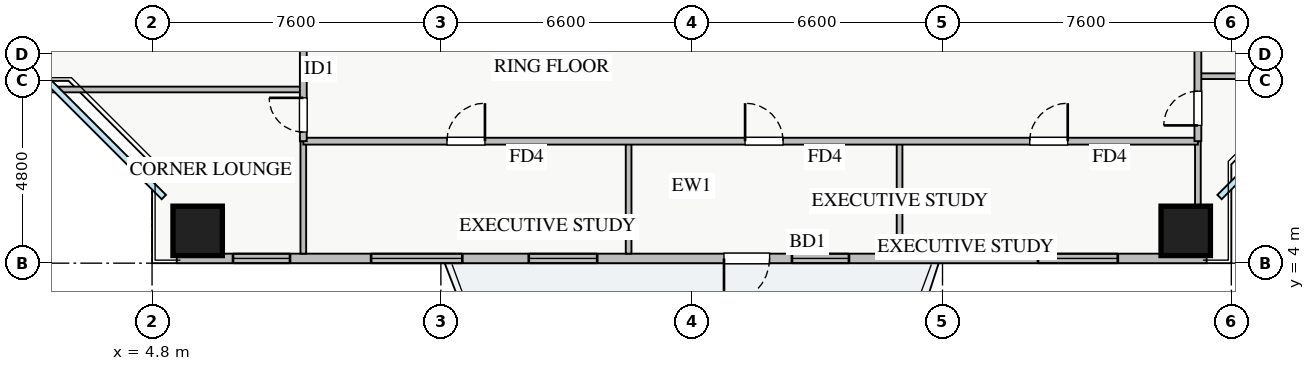
"""IFC4 building model, lengths in metres.
Left out: names, types, materials, properties, quantities, classifications, styles, units other than length and angle.
Written with IfcOpenShell. Run it as: python <this file> out.ifc"""

import sys

from ifc_helpers import new_model, si_unit, direction, frame, frame_2d, origin, origin_2d, place, context, subcontext, project, spatial, rectangle, extrude, source, transform, mapped, element, fill, save


model = new_model("IFC4")
c1 = context("Model", 3, precision=1e-05, world=origin(), true_north=direction((0.0, 1.0)))
c2 = subcontext(c1, "Body", "Model", "MODEL_VIEW")
j1 = project(units=[si_unit("LENGTHUNIT", "METRE"), si_unit("PLANEANGLEUNIT", "RADIAN")], contexts=[c1])
p1 = place(None, origin())
s1 = spatial("IfcSite", under=j1, at=p1, CompositionType="ELEMENT")
p2 = place(p1, origin())
s2 = spatial("IfcBuilding", under=s1, at=p2, CompositionType="ELEMENT")
p3 = place(p2, frame((0.0, 0.0, 29.5)))
s3 = spatial("IfcBuildingStorey", under=s2, at=p3, CompositionType="ELEMENT", Elevation=29.5)
m1 = source(origin(), c2, "Body", "SweptSolid", [
    extrude(rectangle(XDim=1.3, YDim=1.3, at=origin_2d()), origin(), (0.0, 0.0, 1.0), 3.25),
])
for number, where, z_axis, x_axis in (
    (1, (6.0, 4.85, 0.0), (0.0, 0.0, 1.0), (1.0, 0.0, 0.0)),
    (2, (32.0, 4.85, 0.0), (0.0, 0.0, 1.0), (1.0, 0.0, 0.0)),
):
    element("IfcColumn", number, at=place(p3, frame(where, z_axis=z_axis, x_axis=x_axis)), inside=s3, PredefinedType="COLUMN", context=c2, shape_type="MappedRepresentation", body=[
        mapped(m1, transform((0.0, 0.0, 0.0), x_axis=(1.0, 0.0, 0.0), y_axis=(0.0, 1.0, 0.0), z_axis=(0.0, 0.0, 1.0), scale=1.0)),
    ])
p4 = place(p3, frame((5.45, 4.125, 0.0), z_axis=(0.0, 0.0, 1.0), x_axis=(1.0, 0.0, 0.0)))
e3 = element("IfcWall", 3, at=p4, inside=s3, PredefinedType="STANDARD", context=c2, shape_type="SweptSolid", body=[
    extrude(rectangle(XDim=27.1, YDim=0.25, at=frame_2d((13.55, 0.0))), origin(), (0.0, 0.0, 1.0), 2.61),
])
p5 = place(p4, frame((14.4, 0.0, 0.0)))
e4 = element("IfcOpeningElement", 4, at=p5, cuts=e3, PredefinedType="OPENING", context=c2, shape_type="SweptSolid", body=[
    extrude(rectangle(XDim=1.2, YDim=2.1, at=frame_2d((0.6, 1.05))), frame((0.0, 0.135, 0.0), z_axis=(0.0, -1.0, 0.0), x_axis=(1.0, 0.0, 0.0)), (0.0, 0.0, 1.0), 0.27),
])
p6 = place(p4, frame((1.48, 0.0, 0.9)))
e5 = element("IfcOpeningElement", 5, at=p6, cuts=e3, PredefinedType="OPENING", context=c2, shape_type="SweptSolid", body=[
    extrude(rectangle(XDim=1.5, YDim=1.5, at=frame_2d((0.75, 0.75))), frame((0.0, 0.135, 0.0), z_axis=(0.0, -1.0, 0.0), x_axis=(1.0, 0.0, 0.0)), (0.0, 0.0, 1.0), 0.27),
])
p7 = place(p4, frame((9.263, 0.0, 0.9)))
e6 = element("IfcOpeningElement", 6, at=p7, cuts=e3, PredefinedType="OPENING", context=c2, shape_type="SweptSolid", body=[
    extrude(rectangle(XDim=1.8, YDim=1.45, at=frame_2d((0.9, 0.725))), frame((0.0, 0.135, 0.0), z_axis=(0.0, -1.0, 0.0), x_axis=(1.0, 0.0, 0.0)), (0.0, 0.0, 1.0), 0.27),
])
p8 = place(p4, frame((16.188, 0.0, 0.9)))
e7 = element("IfcOpeningElement", 7, at=p8, cuts=e3, PredefinedType="OPENING", context=c2, shape_type="SweptSolid", body=[
    extrude(rectangle(XDim=1.5, YDim=1.45, at=frame_2d((0.75, 0.725))), frame((0.0, 0.135, 0.0), z_axis=(0.0, -1.0, 0.0), x_axis=(1.0, 0.0, 0.0)), (0.0, 0.0, 1.0), 0.27),
])
p9 = place(p4, frame((22.663, 0.0, 0.9)))
e8 = element("IfcOpeningElement", 8, at=p9, cuts=e3, PredefinedType="OPENING", context=c2, shape_type="SweptSolid", body=[
    extrude(rectangle(XDim=2.1, YDim=1.48, at=frame_2d((1.05, 0.74))), frame((0.0, 0.135, 0.0), z_axis=(0.0, -1.0, 0.0), x_axis=(1.0, 0.0, 0.0)), (0.0, 0.0, 1.0), 0.27),
])
p10 = place(p4, frame((5.114, 0.0, 0.9)))
e9 = element("IfcOpeningElement", 9, at=p10, cuts=e3, PredefinedType="OPENING", context=c2, shape_type="SweptSolid", body=[
    extrude(rectangle(XDim=2.4, YDim=1.5, at=frame_2d((1.2, 0.75))), frame((0.0, 0.135, 0.0), z_axis=(0.0, -1.0, 0.0), x_axis=(1.0, 0.0, 0.0)), (0.0, 0.0, 1.0), 0.27),
])
for number, where, z_axis, x_axis in (
    (10, (17.34, 4.25, 0.0), (0.0, 0.0, 1.0), (0.0, 1.0, 0.0)),
    (11, (24.47, 4.25, 0.0), (0.0, 0.0, 1.0), (0.0, 1.0, 0.0)),
    (12, (8.78, 4.25, 0.0), (0.0, 0.0, 1.0), (0.0, 1.0, 0.0)),
    (13, (32.32, 4.25, 0.0), (0.0, 0.0, 1.0), (0.0, 1.0, 0.0)),
):
    element("IfcWall", number, at=place(p3, frame(where, z_axis=z_axis, x_axis=x_axis)), inside=s3, PredefinedType="PARTITIONING", context=c2, shape_type="SweptSolid", body=[
        extrude(rectangle(XDim=2.96, YDim=0.15, at=frame_2d((1.48, 0.0))), origin(), (0.0, 0.0, 1.0), 3.07),
    ])
p11 = place(p3, frame((8.78, 7.21, 0.0), z_axis=(0.0, 0.0, 1.0), x_axis=(1.0, 0.0, 0.0)))
e14 = element("IfcWall", 14, at=p11, inside=s3, PredefinedType="PARTITIONING", context=c2, shape_type="SweptSolid", body=[
    extrude(rectangle(XDim=23.54, YDim=0.18, at=frame_2d((11.77, 0.0))), origin(), (0.0, 0.0, 1.0), 3.07),
])
p12 = place(p11, frame((3.78, 0.0, 0.0)))
e15 = element("IfcOpeningElement", 15, at=p12, cuts=e14, PredefinedType="OPENING", context=c2, shape_type="SweptSolid", body=[
    extrude(rectangle(XDim=1.0, YDim=2.05, at=frame_2d((0.5, 1.025))), frame((0.0, 0.1, 0.0), z_axis=(0.0, -1.0, 0.0), x_axis=(1.0, 0.0, 0.0)), (0.0, 0.0, 1.0), 0.2),
])
p13 = place(p11, frame((11.625, 0.0, 0.0)))
e16 = element("IfcOpeningElement", 16, at=p13, cuts=e14, PredefinedType="OPENING", context=c2, shape_type="SweptSolid", body=[
    extrude(rectangle(XDim=1.0, YDim=2.05, at=frame_2d((0.5, 1.025))), frame((0.0, 0.1, 0.0), z_axis=(0.0, -1.0, 0.0), x_axis=(1.0, 0.0, 0.0)), (0.0, 0.0, 1.0), 0.2),
])
p14 = place(p11, frame((19.115, 0.0, 0.0)))
e17 = element("IfcOpeningElement", 17, at=p14, cuts=e14, PredefinedType="OPENING", context=c2, shape_type="SweptSolid", body=[
    extrude(rectangle(XDim=1.0, YDim=2.05, at=frame_2d((0.5, 1.025))), frame((0.0, 0.1, 0.0), z_axis=(0.0, -1.0, 0.0), x_axis=(1.0, 0.0, 0.0)), (0.0, 0.0, 1.0), 0.2),
])
p15 = place(p3, frame((0.25, 8.57, 0.0), z_axis=(0.0, 0.0, 1.0), x_axis=(1.0, 0.0, 0.0)))
e18 = element("IfcWall", 18, at=p15, inside=s3, PredefinedType="PARTITIONING", context=c2, shape_type="SweptSolid", body=[
    extrude(rectangle(XDim=8.53, YDim=0.15, at=frame_2d((4.265, 0.0))), origin(), (0.0, 0.0, 1.0), 3.07),
])
p16 = place(p3, frame((8.78, 7.21, 0.0), z_axis=(0.0, 0.0, 1.0), x_axis=(0.0, 1.0, 0.0)))
e19 = element("IfcWall", 19, at=p16, inside=s3, PredefinedType="PARTITIONING", context=c2, shape_type="SweptSolid", body=[
    extrude(rectangle(XDim=31.23, YDim=0.18, at=frame_2d((15.615, 0.0))), origin(), (0.0, 0.0, 1.0), 3.07),
])
p17 = place(p16, frame((30.09, 0.0, 0.0)))
e20 = element("IfcOpeningElement", 20, at=p17, cuts=e19, PredefinedType="OPENING", context=c2, shape_type="SweptSolid", body=[
    extrude(rectangle(XDim=0.9, YDim=2.05, at=frame_2d((0.45, 1.025))), frame((0.0, 0.1, 0.0), z_axis=(0.0, -1.0, 0.0), x_axis=(1.0, 0.0, 0.0)), (0.0, 0.0, 1.0), 0.2),
])
p18 = place(p16, frame((0.24, 0.0, 0.0)))
e21 = element("IfcOpeningElement", 21, at=p18, cuts=e19, PredefinedType="OPENING", context=c2, shape_type="SweptSolid", body=[
    extrude(rectangle(XDim=0.9, YDim=2.05, at=frame_2d((0.45, 1.025))), frame((0.0, 0.1, 0.0), z_axis=(0.0, -1.0, 0.0), x_axis=(1.0, 0.0, 0.0)), (0.0, 0.0, 1.0), 0.2),
])
p19 = place(p16, frame((3.975, 0.0, 0.0)))
e22 = element("IfcOpeningElement", 22, at=p19, cuts=e19, PredefinedType="OPENING", context=c2, shape_type="SweptSolid", body=[
    extrude(rectangle(XDim=1.0, YDim=2.05, at=frame_2d((0.5, 1.025))), frame((0.0, 0.1, 0.0), z_axis=(0.0, -1.0, 0.0), x_axis=(1.0, 0.0, 0.0)), (0.0, 0.0, 1.0), 0.2),
])
p20 = place(p16, frame((22.0, 0.0, 0.0)))
e23 = element("IfcOpeningElement", 23, at=p20, cuts=e19, PredefinedType="OPENING", context=c2, shape_type="SweptSolid", body=[
    extrude(rectangle(XDim=1.0, YDim=2.05, at=frame_2d((0.5, 1.025))), frame((0.0, 0.1, 0.0), z_axis=(0.0, -1.0, 0.0), x_axis=(1.0, 0.0, 0.0)), (0.0, 0.0, 1.0), 0.2),
])
p21 = place(p3, frame((32.32, 8.92, 0.0), z_axis=(0.0, 0.0, 1.0), x_axis=(1.0, 0.0, 0.0)))
e24 = element("IfcWall", 24, at=p21, inside=s3, PredefinedType="PARTITIONING", context=c2, shape_type="SweptSolid", body=[
    extrude(rectangle(XDim=5.43, YDim=0.15, at=frame_2d((2.715, 0.0))), origin(), (0.0, 0.0, 1.0), 3.07),
])
p22 = place(p3, frame((32.32, 7.21, 0.0), z_axis=(0.0, 0.0, 1.0), x_axis=(0.0, 1.0, 0.0)))
e25 = element("IfcWall", 25, at=p22, inside=s3, PredefinedType="PARTITIONING", context=c2, shape_type="SweptSolid", body=[
    extrude(rectangle(XDim=31.23, YDim=0.18, at=frame_2d((15.615, 0.0))), origin(), (0.0, 0.0, 1.0), 2.765),
])
p23 = place(p22, frame((30.09, 0.0, 0.0)))
e26 = element("IfcOpeningElement", 26, at=p23, cuts=e25, PredefinedType="OPENING", context=c2, shape_type="SweptSolid", body=[
    extrude(rectangle(XDim=0.9, YDim=2.05, at=frame_2d((0.45, 1.025))), frame((0.0, 0.1, 0.0), z_axis=(0.0, -1.0, 0.0), x_axis=(1.0, 0.0, 0.0)), (0.0, 0.0, 1.0), 0.2),
])
p24 = place(p22, frame((0.415, 0.0, 0.0)))
e27 = element("IfcOpeningElement", 27, at=p24, cuts=e25, PredefinedType="OPENING", context=c2, shape_type="SweptSolid", body=[
    extrude(rectangle(XDim=0.9, YDim=2.05, at=frame_2d((0.45, 1.025))), frame((0.0, 0.1, 0.0), z_axis=(0.0, -1.0, 0.0), x_axis=(1.0, 0.0, 0.0)), (0.0, 0.0, 1.0), 0.2),
])
p25 = place(p22, frame((8.575, 0.0, 0.0)))
e28 = element("IfcOpeningElement", 28, at=p25, cuts=e25, PredefinedType="OPENING", context=c2, shape_type="SweptSolid", body=[
    extrude(rectangle(XDim=1.0, YDim=2.05, at=frame_2d((0.5, 1.025))), frame((0.0, 0.1, 0.0), z_axis=(0.0, -1.0, 0.0), x_axis=(1.0, 0.0, 0.0)), (0.0, 0.0, 1.0), 0.2),
])
p26 = place(p22, frame((19.375, 0.0, 0.0)))
e29 = element("IfcOpeningElement", 29, at=p26, cuts=e25, PredefinedType="OPENING", context=c2, shape_type="SweptSolid", body=[
    extrude(rectangle(XDim=1.0, YDim=2.05, at=frame_2d((0.5, 1.025))), frame((0.0, 0.1, 0.0), z_axis=(0.0, -1.0, 0.0), x_axis=(1.0, 0.0, 0.0)), (0.0, 0.0, 1.0), 0.2),
])
m2 = source(origin(), c2, "Body", "SweptSolid", [
    extrude(rectangle(XDim=1.2, YDim=2.1, at=frame_2d((0.6, 1.05))), frame((0.0, 0.025, 0.0), z_axis=(0.0, -1.0, 0.0), x_axis=(1.0, 0.0, 0.0)), (0.0, 0.0, 1.0), 0.05),
])
p27 = place(p5, frame((1.2, 0.0, 0.0), z_axis=(0.0, 0.0, 1.0), x_axis=(-1.0, 0.0, 0.0)))
e30 = element("IfcDoor", 30, at=p27, inside=s3, OperationType="SINGLE_SWING_LEFT", PredefinedType="DOOR", context=c2, shape_type="MappedRepresentation", body=[
    mapped(m2, transform((0.0, 0.0, 0.0), x_axis=(1.0, 0.0, 0.0), y_axis=(0.0, 1.0, 0.0), z_axis=(0.0, 0.0, 1.0), scale=1.0)),
])
fill(e4, e30)
m3 = source(origin(), c2, "Body", "SweptSolid", [
    extrude(rectangle(XDim=1.5, YDim=1.5, at=frame_2d((0.75, 0.75))), frame((0.0, 0.03, 0.0), z_axis=(0.0, -1.0, 0.0), x_axis=(1.0, 0.0, 0.0)), (0.0, 0.0, 1.0), 0.06),
])
p28 = place(p6, origin())
e31 = element("IfcWindow", 31, at=p28, inside=s3, PartitioningType="TRIPLE_PANEL_VERTICAL", PredefinedType="WINDOW", context=c2, shape_type="MappedRepresentation", body=[
    mapped(m3, transform((0.0, 0.0, 0.0), x_axis=(1.0, 0.0, 0.0), y_axis=(0.0, 1.0, 0.0), z_axis=(0.0, 0.0, 1.0), scale=1.0)),
])
fill(e5, e31)
m4 = source(origin(), c2, "Body", "SweptSolid", [
    extrude(rectangle(XDim=1.8, YDim=1.45, at=frame_2d((0.9, 0.725))), frame((0.0, 0.03, 0.0), z_axis=(0.0, -1.0, 0.0), x_axis=(1.0, 0.0, 0.0)), (0.0, 0.0, 1.0), 0.06),
])
p29 = place(p7, origin())
e32 = element("IfcWindow", 32, at=p29, inside=s3, PartitioningType="DOUBLE_PANEL_VERTICAL", PredefinedType="WINDOW", context=c2, shape_type="MappedRepresentation", body=[
    mapped(m4, transform((0.0, 0.0, 0.0), x_axis=(1.0, 0.0, 0.0), y_axis=(0.0, 1.0, 0.0), z_axis=(0.0, 0.0, 1.0), scale=1.0)),
])
fill(e6, e32)
m5 = source(origin(), c2, "Body", "SweptSolid", [
    extrude(rectangle(XDim=1.5, YDim=1.45, at=frame_2d((0.75, 0.725))), frame((0.0, 0.03, 0.0), z_axis=(0.0, -1.0, 0.0), x_axis=(1.0, 0.0, 0.0)), (0.0, 0.0, 1.0), 0.06),
])
p30 = place(p8, origin())
e33 = element("IfcWindow", 33, at=p30, inside=s3, PartitioningType="DOUBLE_PANEL_VERTICAL", PredefinedType="WINDOW", context=c2, shape_type="MappedRepresentation", body=[
    mapped(m5, transform((0.0, 0.0, 0.0), x_axis=(1.0, 0.0, 0.0), y_axis=(0.0, 1.0, 0.0), z_axis=(0.0, 0.0, 1.0), scale=1.0)),
])
fill(e7, e33)
m6 = source(origin(), c2, "Body", "SweptSolid", [
    extrude(rectangle(XDim=2.1, YDim=1.48, at=frame_2d((1.05, 0.74))), frame((0.0, 0.03, 0.0), z_axis=(0.0, -1.0, 0.0), x_axis=(1.0, 0.0, 0.0)), (0.0, 0.0, 1.0), 0.06),
])
p31 = place(p9, origin())
e34 = element("IfcWindow", 34, at=p31, inside=s3, PartitioningType="TRIPLE_PANEL_VERTICAL", PredefinedType="WINDOW", context=c2, shape_type="MappedRepresentation", body=[
    mapped(m6, transform((0.0, 0.0, 0.0), x_axis=(1.0, 0.0, 0.0), y_axis=(0.0, 1.0, 0.0), z_axis=(0.0, 0.0, 1.0), scale=1.0)),
])
fill(e8, e34)
m7 = source(origin(), c2, "Body", "SweptSolid", [
    extrude(rectangle(XDim=1.0, YDim=2.05, at=frame_2d((0.5, 1.025))), frame((0.0, 0.025, 0.0), z_axis=(0.0, -1.0, 0.0), x_axis=(1.0, 0.0, 0.0)), (0.0, 0.0, 1.0), 0.05),
])
p32 = place(p12, origin())
e35 = element("IfcDoor", 35, at=p32, inside=s3, OperationType="SINGLE_SWING_RIGHT", PredefinedType="DOOR", context=c2, shape_type="MappedRepresentation", body=[
    mapped(m7, transform((0.0, 0.0, 0.0), x_axis=(1.0, 0.0, 0.0), y_axis=(0.0, 1.0, 0.0), z_axis=(0.0, 0.0, 1.0), scale=1.0)),
])
fill(e15, e35)
p33 = place(p13, origin())
e36 = element("IfcDoor", 36, at=p33, inside=s3, OperationType="SINGLE_SWING_LEFT", PredefinedType="DOOR", context=c2, shape_type="MappedRepresentation", body=[
    mapped(m7, transform((0.0, 0.0, 0.0), x_axis=(1.0, 0.0, 0.0), y_axis=(0.0, 1.0, 0.0), z_axis=(0.0, 0.0, 1.0), scale=1.0)),
])
fill(e16, e36)
p34 = place(p14, origin())
e37 = element("IfcDoor", 37, at=p34, inside=s3, OperationType="SINGLE_SWING_RIGHT", PredefinedType="DOOR", context=c2, shape_type="MappedRepresentation", body=[
    mapped(m7, transform((0.0, 0.0, 0.0), x_axis=(1.0, 0.0, 0.0), y_axis=(0.0, 1.0, 0.0), z_axis=(0.0, 0.0, 1.0), scale=1.0)),
])
fill(e17, e37)
m8 = source(origin(), c2, "Body", "SweptSolid", [
    extrude(rectangle(XDim=0.9, YDim=2.05, at=frame_2d((0.45, 1.025))), frame((0.0, 0.025, 0.0), z_axis=(0.0, -1.0, 0.0), x_axis=(1.0, 0.0, 0.0)), (0.0, 0.0, 1.0), 0.05),
])
p35 = place(p18, origin())
e38 = element("IfcDoor", 38, at=p35, inside=s3, OperationType="SINGLE_SWING_RIGHT", PredefinedType="DOOR", context=c2, shape_type="MappedRepresentation", body=[
    mapped(m8, transform((0.0, 0.0, 0.0), x_axis=(1.0, 0.0, 0.0), y_axis=(0.0, 1.0, 0.0), z_axis=(0.0, 0.0, 1.0), scale=1.0)),
])
fill(e21, e38)
p36 = place(p24, origin())
e39 = element("IfcDoor", 39, at=p36, inside=s3, OperationType="SINGLE_SWING_LEFT", PredefinedType="DOOR", context=c2, shape_type="MappedRepresentation", body=[
    mapped(m8, transform((0.0, 0.0, 0.0), x_axis=(1.0, 0.0, 0.0), y_axis=(0.0, 1.0, 0.0), z_axis=(0.0, 0.0, 1.0), scale=1.0)),
])
fill(e27, e39)
m9 = source(origin(), c2, "Body", "SweptSolid", [
    extrude(rectangle(XDim=2.4, YDim=1.5, at=frame_2d((1.2, 0.75))), frame((0.0, 0.03, 0.0), z_axis=(0.0, -1.0, 0.0), x_axis=(1.0, 0.0, 0.0)), (0.0, 0.0, 1.0), 0.06),
])
p37 = place(p10, origin())
e40 = element("IfcWindow", 40, at=p37, inside=s3, PartitioningType="TRIPLE_PANEL_VERTICAL", PredefinedType="WINDOW", context=c2, shape_type="MappedRepresentation", body=[
    mapped(m9, transform((0.0, 0.0, 0.0), x_axis=(1.0, 0.0, 0.0), y_axis=(0.0, 1.0, 0.0), z_axis=(0.0, 0.0, 1.0), scale=1.0)),
])
fill(e9, e40)
save(model, sys.argv[1])
